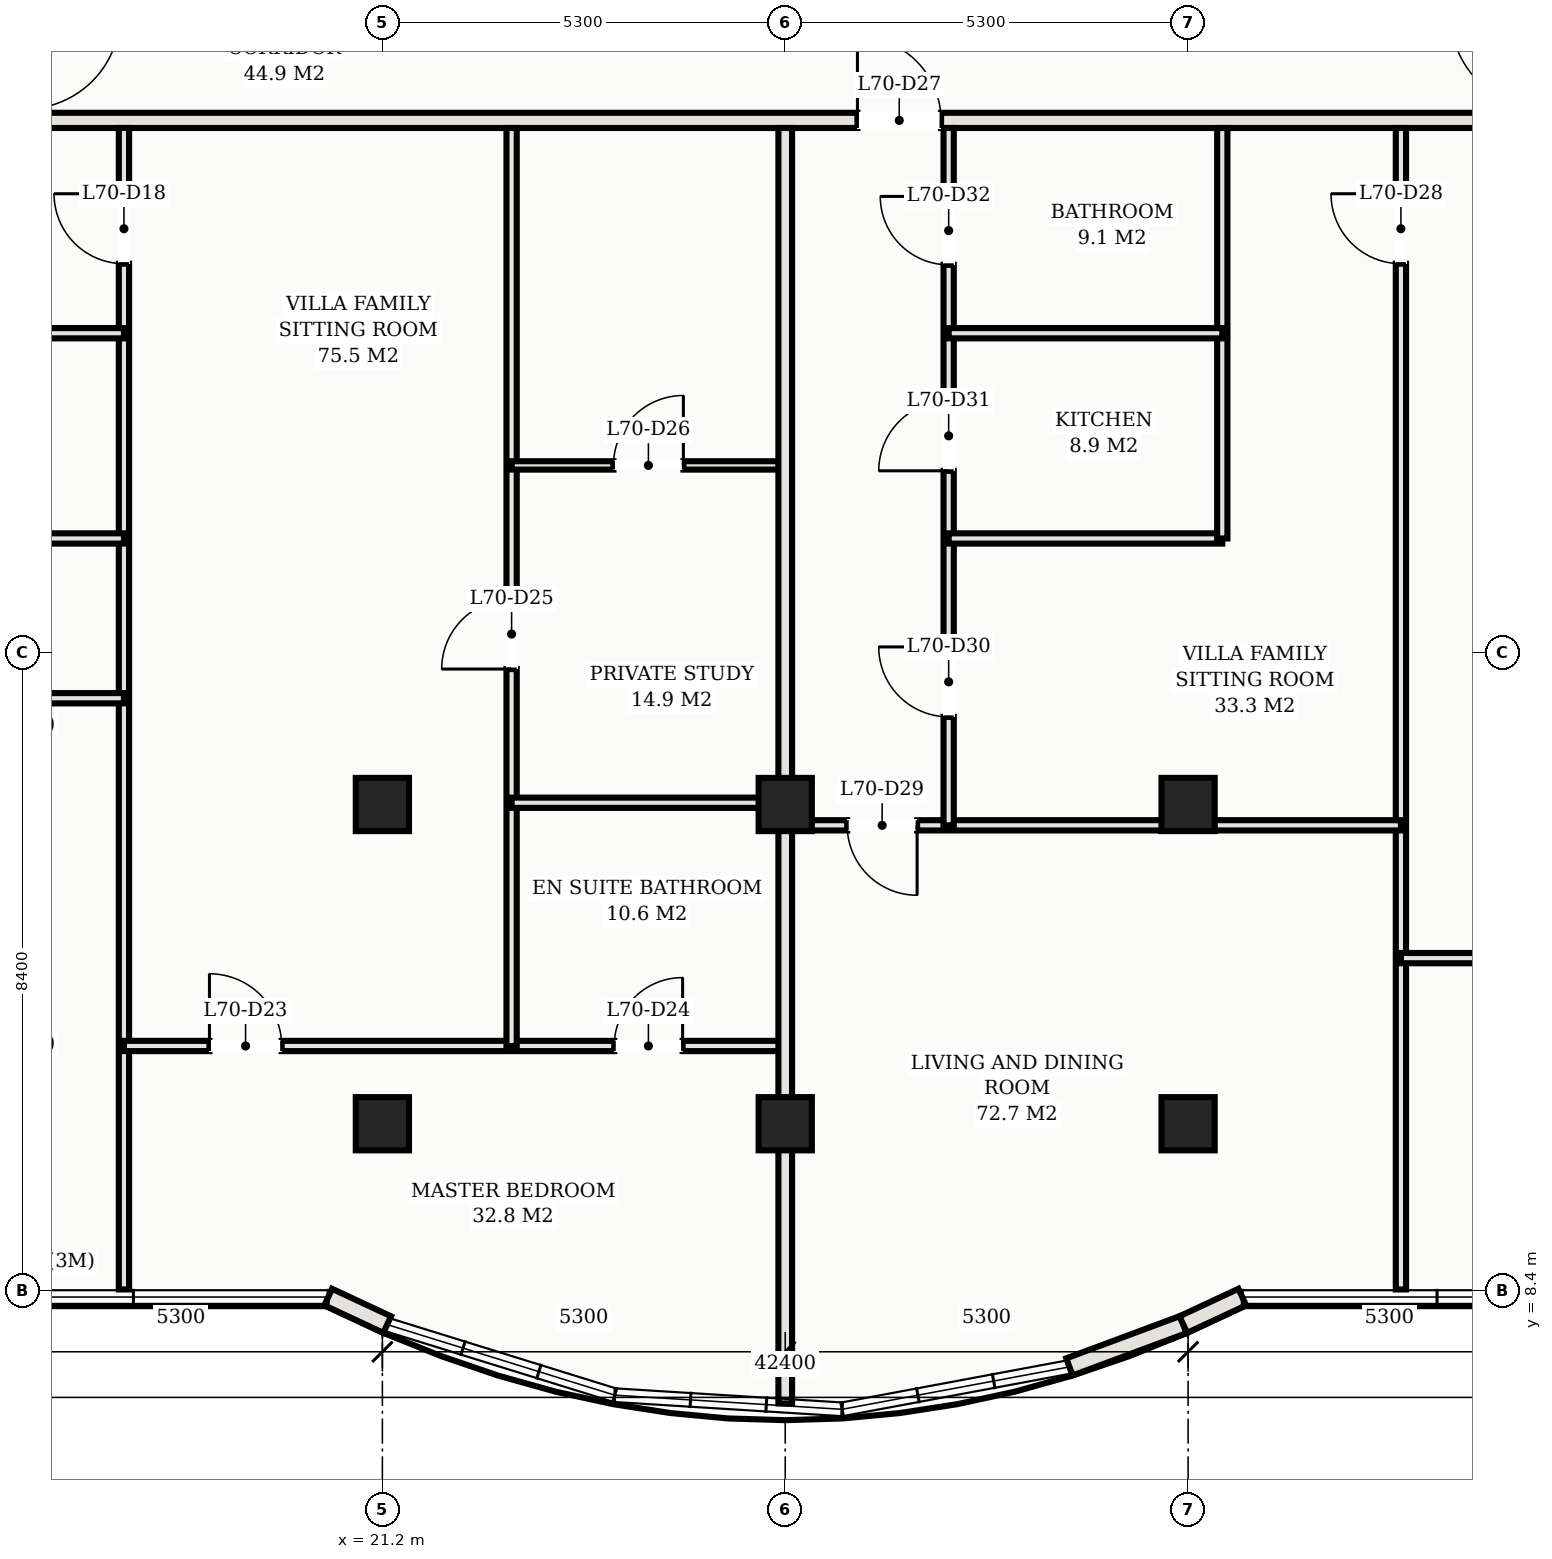
"""IFC4 building model, lengths in metres.
Left out: names, types, materials, properties, quantities, classifications, styles, units other than length and angle.
Written with IfcOpenShell. Run it as: python <this file> out.ifc"""

import sys

from ifc_helpers import new_model, si_unit, direction, frame, frame_2d, origin, origin_2d, place, context, subcontext, project, spatial, rectangle, hollow_rectangle, extrude, element, fill, save


model = new_model("IFC4")
c1 = context("Model", 3, precision=1e-05, world=origin(), true_north=direction((0.0, 1.0)))
c2 = subcontext(c1, "Body", "Model", "MODEL_VIEW")
j1 = project(units=[si_unit("LENGTHUNIT", "METRE"), si_unit("PLANEANGLEUNIT", "RADIAN")], contexts=[c1])
p1 = place(None, origin())
s1 = spatial("IfcSite", under=j1, at=p1, CompositionType="ELEMENT")
p2 = place(p1, origin())
s2 = spatial("IfcBuilding", under=s1, at=p2, CompositionType="ELEMENT")
p3 = place(p2, frame((0.0, 0.0, 252.8)))
s3 = spatial("IfcBuildingStorey", under=s2, at=p3, CompositionType="ELEMENT", Elevation=252.8)
for number, where, z_axis, x_axis in (
    (1, (21.2, 14.8, 0.0), (0.0, 0.0, 1.0), (1.0, 0.0, 0.0)),
    (2, (21.2, 10.6, 0.0), (0.0, 0.0, 1.0), (1.0, 0.0, 0.0)),
    (3, (26.5, 14.8, 0.0), (0.0, 0.0, 1.0), (1.0, 0.0, 0.0)),
    (4, (26.5, 10.6, 0.0), (0.0, 0.0, 1.0), (1.0, 0.0, 0.0)),
    (5, (31.8, 14.8, 0.0), (0.0, 0.0, 1.0), (1.0, 0.0, 0.0)),
    (6, (31.8, 10.6, 0.0), (0.0, 0.0, 1.0), (1.0, 0.0, 0.0)),
):
    element("IfcColumn", number, at=place(p3, frame(where, z_axis=z_axis, x_axis=x_axis)), inside=s3, PredefinedType="COLUMN", context=c2, shape_type="SweptSolid", body=[
        extrude(hollow_rectangle(XDim=0.7, YDim=0.7, WallThickness=0.025, at=origin_2d()), origin(), (0.0, 0.0, 1.0), 3.3),
    ])
p4 = place(p3, frame((20.487, 8.32, 0.0), z_axis=(0.0, 0.0, 1.0), x_axis=(0.906190424584, -0.422869855147, 0.0)))
e7 = element("IfcWall", 7, at=p4, inside=s3, PredefinedType="SOLIDWALL", context=c2, shape_type="SweptSolid", body=[
    extrude(rectangle(XDim=0.856, YDim=0.24, at=frame_2d((0.428, 0.0))), origin(), (0.0, 0.0, 1.0), 3.11),
])
p5 = place(p3, frame((30.239, 7.401, 0.0), z_axis=(0.0, 0.0, 1.0), x_axis=(0.937279890693, 0.34857769077, 0.0)))
e8 = element("IfcWall", 8, at=p5, inside=s3, PredefinedType="SOLIDWALL", context=c2, shape_type="SweptSolid", body=[
    extrude(rectangle(XDim=1.598, YDim=0.24, at=frame_2d((0.799, 0.0))), origin(), (0.0, 0.0, 1.0), 3.11),
])
p6 = place(p3, frame((31.737, 7.958, 0.0), z_axis=(0.0, 0.0, 1.0), x_axis=(0.906190424584, 0.422869855147, 0.0)))
e9 = element("IfcWall", 9, at=p6, inside=s3, PredefinedType="SOLIDWALL", context=c2, shape_type="SweptSolid", body=[
    extrude(rectangle(XDim=0.856, YDim=0.24, at=frame_2d((0.428, 0.0))), origin(), (0.0, 0.0, 1.0), 3.11),
])
p7 = place(p3, frame((8.6, 23.8, 0.0), z_axis=(0.0, 0.0, 1.0), x_axis=(1.0, 0.0, 0.0)))
e10 = element("IfcWall", 10, at=p7, inside=s3, PredefinedType="PARTITIONING", context=c2, shape_type="SweptSolid", body=[
    extrude(rectangle(XDim=35.8, YDim=0.2, at=frame_2d((17.9, 0.0))), origin(), (0.0, 0.0, 1.0), 2.45),
])
p8 = place(p7, frame((2.75, 0.0, 0.0)))
e11 = element("IfcOpeningElement", 11, at=p8, cuts=e10, PredefinedType="OPENING", context=c2, shape_type="SweptSolid", body=[
    extrude(rectangle(XDim=1.1, YDim=2.25, at=frame_2d((0.55, 1.125))), frame((0.0, 0.11, 0.0), z_axis=(0.0, -1.0, 0.0), x_axis=(1.0, 0.0, 0.0)), (0.0, 0.0, 1.0), 0.22),
])
p9 = place(p7, frame((18.85, 0.0, 0.0)))
e12 = element("IfcOpeningElement", 12, at=p9, cuts=e10, PredefinedType="OPENING", context=c2, shape_type="SweptSolid", body=[
    extrude(rectangle(XDim=1.1, YDim=2.25, at=frame_2d((0.55, 1.125))), frame((0.0, 0.11, 0.0), z_axis=(0.0, -1.0, 0.0), x_axis=(1.0, 0.0, 0.0)), (0.0, 0.0, 1.0), 0.22),
])
p10 = place(p7, frame((0.505, 0.0, 0.0)))
e13 = element("IfcOpeningElement", 13, at=p10, cuts=e10, PredefinedType="OPENING", context=c2, shape_type="SweptSolid", body=[
    extrude(rectangle(XDim=0.9, YDim=2.15, at=frame_2d((0.45, 1.075))), frame((0.0, 0.11, 0.0), z_axis=(0.0, -1.0, 0.0), x_axis=(1.0, 0.0, 0.0)), (0.0, 0.0, 1.0), 0.22),
])
p11 = place(p7, frame((34.395, 0.0, 0.0)))
e14 = element("IfcOpeningElement", 14, at=p11, cuts=e10, PredefinedType="OPENING", context=c2, shape_type="SweptSolid", body=[
    extrude(rectangle(XDim=0.9, YDim=2.15, at=frame_2d((0.45, 1.075))), frame((0.0, 0.11, 0.0), z_axis=(0.0, -1.0, 0.0), x_axis=(1.0, 0.0, 0.0)), (0.0, 0.0, 1.0), 0.22),
])
p12 = place(p3, frame((17.8, 8.42, 0.0), z_axis=(0.0, 0.0, 1.0), x_axis=(0.0, 1.0, 0.0)))
e15 = element("IfcWall", 15, at=p12, inside=s3, PredefinedType="PARTITIONING", context=c2, shape_type="SweptSolid", body=[
    extrude(rectangle(XDim=15.28, YDim=0.135, at=frame_2d((7.64, 0.0))), origin(), (0.0, 0.0, 1.0), 2.45),
])
p13 = place(p12, frame((13.495, 0.0, 0.0)))
e16 = element("IfcOpeningElement", 16, at=p13, cuts=e15, PredefinedType="OPENING", context=c2, shape_type="SweptSolid", body=[
    extrude(rectangle(XDim=0.92, YDim=2.15, at=frame_2d((0.46, 1.075))), frame((0.0, 0.078, 0.0), z_axis=(0.0, -1.0, 0.0), x_axis=(1.0, 0.0, 0.0)), (0.0, 0.0, 1.0), 0.155),
])
p14 = place(p3, frame((10.6, 16.198, 0.0), z_axis=(0.0, 0.0, 1.0), x_axis=(1.0, 0.0, 0.0)))
e17 = element("IfcWall", 17, at=p14, inside=s3, PredefinedType="PARTITIONING", context=c2, shape_type="SweptSolid", body=[
    extrude(rectangle(XDim=7.2, YDim=0.135, at=frame_2d((3.6, 0.0))), origin(), (0.0, 0.0, 1.0), 2.45),
])
p15 = place(p14, frame((0.815, 0.0, 0.0)))
e18 = element("IfcOpeningElement", 18, at=p15, cuts=e17, PredefinedType="OPENING", context=c2, shape_type="SweptSolid", body=[
    extrude(rectangle(XDim=0.92, YDim=2.15, at=frame_2d((0.46, 1.075))), frame((0.0, 0.078, 0.0), z_axis=(0.0, -1.0, 0.0), x_axis=(1.0, 0.0, 0.0)), (0.0, 0.0, 1.0), 0.155),
])
for number, where, z_axis, x_axis in (
    (19, (12.75, 18.3, 0.0), (0.0, 0.0, 1.0), (1.0, 0.0, 0.0)),
    (20, (12.75, 21.0, 0.0), (0.0, 0.0, 1.0), (1.0, 0.0, 0.0)),
):
    element("IfcWall", number, at=place(p3, frame(where, z_axis=z_axis, x_axis=x_axis)), inside=s3, PredefinedType="PARTITIONING", context=c2, shape_type="SweptSolid", body=[
        extrude(rectangle(XDim=5.05, YDim=0.135, at=frame_2d((2.525, 0.0))), origin(), (0.0, 0.0, 1.0), 2.45),
    ])
p16 = place(p3, frame((17.8, 11.623, 0.0), z_axis=(0.0, 0.0, 1.0), x_axis=(1.0, 0.0, 0.0)))
e21 = element("IfcWall", 21, at=p16, inside=s3, PredefinedType="PARTITIONING", context=c2, shape_type="SweptSolid", body=[
    extrude(rectangle(XDim=8.7, YDim=0.135, at=frame_2d((4.35, 0.0))), origin(), (0.0, 0.0, 1.0), 2.45),
])
p17 = place(p16, frame((1.125, 0.0, 0.0)))
e22 = element("IfcOpeningElement", 22, at=p17, cuts=e21, PredefinedType="OPENING", context=c2, shape_type="SweptSolid", body=[
    extrude(rectangle(XDim=0.95, YDim=2.15, at=frame_2d((0.475, 1.075))), frame((0.0, 0.078, 0.0), z_axis=(0.0, -1.0, 0.0), x_axis=(1.0, 0.0, 0.0)), (0.0, 0.0, 1.0), 0.155),
])
p18 = place(p16, frame((6.45, 0.0, 0.0)))
e23 = element("IfcOpeningElement", 23, at=p18, cuts=e21, PredefinedType="OPENING", context=c2, shape_type="SweptSolid", body=[
    extrude(rectangle(XDim=0.9, YDim=2.15, at=frame_2d((0.45, 1.075))), frame((0.0, 0.078, 0.0), z_axis=(0.0, -1.0, 0.0), x_axis=(1.0, 0.0, 0.0)), (0.0, 0.0, 1.0), 0.155),
])
p19 = place(p3, frame((22.9, 11.623, 0.0), z_axis=(0.0, 0.0, 1.0), x_axis=(0.0, 1.0, 0.0)))
e24 = element("IfcWall", 24, at=p19, inside=s3, PredefinedType="PARTITIONING", context=c2, shape_type="SweptSolid", body=[
    extrude(rectangle(XDim=12.077, YDim=0.135, at=frame_2d((6.039, 0.0))), origin(), (0.0, 0.0, 1.0), 2.45),
])
p20 = place(p19, frame((4.959, 0.0, 0.0)))
e25 = element("IfcOpeningElement", 25, at=p20, cuts=e24, PredefinedType="OPENING", context=c2, shape_type="SweptSolid", body=[
    extrude(rectangle(XDim=0.92, YDim=2.15, at=frame_2d((0.46, 1.075))), frame((0.0, 0.078, 0.0), z_axis=(0.0, -1.0, 0.0), x_axis=(1.0, 0.0, 0.0)), (0.0, 0.0, 1.0), 0.155),
])
p21 = place(p3, frame((22.9, 14.823, 0.0), z_axis=(0.0, 0.0, 1.0), x_axis=(1.0, 0.0, 0.0)))
e26 = element("IfcWall", 26, at=p21, inside=s3, PredefinedType="PARTITIONING", context=c2, shape_type="SweptSolid", body=[
    extrude(rectangle(XDim=3.6, YDim=0.135, at=frame_2d((1.8, 0.0))), origin(), (0.0, 0.0, 1.0), 2.45),
])
p22 = place(p3, frame((22.9, 19.261, 0.0), z_axis=(0.0, 0.0, 1.0), x_axis=(1.0, 0.0, 0.0)))
e27 = element("IfcWall", 27, at=p22, inside=s3, PredefinedType="MOVABLE", context=c2, shape_type="SweptSolid", body=[
    extrude(rectangle(XDim=3.6, YDim=0.11, at=frame_2d((1.8, 0.0))), origin(), (0.0, 0.0, 1.0), 2.45),
])
p23 = place(p22, frame((1.34, 0.0, 0.0)))
e28 = element("IfcOpeningElement", 28, at=p23, cuts=e27, PredefinedType="OPENING", context=c2, shape_type="SweptSolid", body=[
    extrude(rectangle(XDim=0.92, YDim=2.15, at=frame_2d((0.46, 1.075))), frame((0.0, 0.065, 0.0), z_axis=(0.0, -1.0, 0.0), x_axis=(1.0, 0.0, 0.0)), (0.0, 0.0, 1.0), 0.13),
])
p24 = place(p3, frame((26.5, 6.92, 0.0), z_axis=(0.0, 0.0, 1.0), x_axis=(0.0, 1.0, 0.0)))
e29 = element("IfcWall", 29, at=p24, inside=s3, PredefinedType="PARTITIONING", context=c2, shape_type="SweptSolid", body=[
    extrude(rectangle(XDim=16.78, YDim=0.18, at=frame_2d((8.39, 0.0))), origin(), (0.0, 0.0, 1.0), 2.45),
])
p25 = place(p3, frame((34.6, 8.42, 0.0), z_axis=(0.0, 0.0, 1.0), x_axis=(0.0, 1.0, 0.0)))
e30 = element("IfcWall", 30, at=p25, inside=s3, PredefinedType="PARTITIONING", context=c2, shape_type="SweptSolid", body=[
    extrude(rectangle(XDim=15.28, YDim=0.135, at=frame_2d((7.64, 0.0))), origin(), (0.0, 0.0, 1.0), 2.45),
])
p26 = place(p25, frame((13.495, 0.0, 0.0)))
e31 = element("IfcOpeningElement", 31, at=p26, cuts=e30, PredefinedType="OPENING", context=c2, shape_type="SweptSolid", body=[
    extrude(rectangle(XDim=0.92, YDim=2.15, at=frame_2d((0.46, 1.075))), frame((0.0, 0.078, 0.0), z_axis=(0.0, -1.0, 0.0), x_axis=(1.0, 0.0, 0.0)), (0.0, 0.0, 1.0), 0.155),
])
p27 = place(p3, frame((26.5, 14.526, 0.0), z_axis=(0.0, 0.0, 1.0), x_axis=(1.0, 0.0, 0.0)))
e32 = element("IfcWall", 32, at=p27, inside=s3, PredefinedType="PARTITIONING", context=c2, shape_type="SweptSolid", body=[
    extrude(rectangle(XDim=8.1, YDim=0.135, at=frame_2d((4.05, 0.0))), origin(), (0.0, 0.0, 1.0), 2.45),
])
p28 = place(p27, frame((0.815, 0.0, 0.0)))
e33 = element("IfcOpeningElement", 33, at=p28, cuts=e32, PredefinedType="OPENING", context=c2, shape_type="SweptSolid", body=[
    extrude(rectangle(XDim=0.92, YDim=2.15, at=frame_2d((0.46, 1.075))), frame((0.0, 0.078, 0.0), z_axis=(0.0, -1.0, 0.0), x_axis=(1.0, 0.0, 0.0)), (0.0, 0.0, 1.0), 0.155),
])
p29 = place(p3, frame((28.65, 14.526, 0.0), z_axis=(0.0, 0.0, 1.0), x_axis=(0.0, 1.0, 0.0)))
e34 = element("IfcWall", 34, at=p29, inside=s3, PredefinedType="PARTITIONING", context=c2, shape_type="SweptSolid", body=[
    extrude(rectangle(XDim=9.174, YDim=0.135, at=frame_2d((4.587, 0.0))), origin(), (0.0, 0.0, 1.0), 2.45),
])
p30 = place(p29, frame((1.427, 0.0, 0.0)))
e35 = element("IfcOpeningElement", 35, at=p30, cuts=e34, PredefinedType="OPENING", context=c2, shape_type="SweptSolid", body=[
    extrude(rectangle(XDim=0.92, YDim=2.15, at=frame_2d((0.46, 1.075))), frame((0.0, 0.078, 0.0), z_axis=(0.0, -1.0, 0.0), x_axis=(1.0, 0.0, 0.0)), (0.0, 0.0, 1.0), 0.155),
])
p31 = place(p29, frame((4.664, 0.0, 0.0)))
e36 = element("IfcOpeningElement", 36, at=p31, cuts=e34, PredefinedType="OPENING", context=c2, shape_type="SweptSolid", body=[
    extrude(rectangle(XDim=0.92, YDim=2.15, at=frame_2d((0.46, 1.075))), frame((0.0, 0.078, 0.0), z_axis=(0.0, -1.0, 0.0), x_axis=(1.0, 0.0, 0.0)), (0.0, 0.0, 1.0), 0.155),
])
p32 = place(p29, frame((7.374, 0.0, 0.0)))
e37 = element("IfcOpeningElement", 37, at=p32, cuts=e34, PredefinedType="OPENING", context=c2, shape_type="SweptSolid", body=[
    extrude(rectangle(XDim=0.9, YDim=2.15, at=frame_2d((0.45, 1.075))), frame((0.0, 0.078, 0.0), z_axis=(0.0, -1.0, 0.0), x_axis=(1.0, 0.0, 0.0)), (0.0, 0.0, 1.0), 0.155),
])
p33 = place(p3, frame((28.65, 18.3, 0.0), z_axis=(0.0, 0.0, 1.0), x_axis=(1.0, 0.0, 0.0)))
e38 = element("IfcWall", 38, at=p33, inside=s3, PredefinedType="PARTITIONING", context=c2, shape_type="SweptSolid", body=[
    extrude(rectangle(XDim=3.6, YDim=0.135, at=frame_2d((1.8, 0.0))), origin(), (0.0, 0.0, 1.0), 2.45),
])
p34 = place(p3, frame((32.25, 18.3, 0.0), z_axis=(0.0, 0.0, 1.0), x_axis=(0.0, 1.0, 0.0)))
e39 = element("IfcWall", 39, at=p34, inside=s3, PredefinedType="PARTITIONING", context=c2, shape_type="SweptSolid", body=[
    extrude(rectangle(XDim=5.4, YDim=0.135, at=frame_2d((2.7, 0.0))), origin(), (0.0, 0.0, 1.0), 2.45),
])
p35 = place(p3, frame((28.65, 21.0, 0.0), z_axis=(0.0, 0.0, 1.0), x_axis=(1.0, 0.0, 0.0)))
e40 = element("IfcWall", 40, at=p35, inside=s3, PredefinedType="PARTITIONING", context=c2, shape_type="SweptSolid", body=[
    extrude(rectangle(XDim=3.6, YDim=0.135, at=frame_2d((1.8, 0.0))), origin(), (0.0, 0.0, 1.0), 2.45),
])
p36 = place(p3, frame((34.6, 12.779, 0.0), z_axis=(0.0, 0.0, 1.0), x_axis=(1.0, 0.0, 0.0)))
e41 = element("IfcWall", 41, at=p36, inside=s3, PredefinedType="PARTITIONING", context=c2, shape_type="SweptSolid", body=[
    extrude(rectangle(XDim=7.8, YDim=0.135, at=frame_2d((3.9, 0.0))), origin(), (0.0, 0.0, 1.0), 2.45),
])
p37 = place(p36, frame((1.625, 0.0, 0.0)))
e42 = element("IfcOpeningElement", 42, at=p37, cuts=e41, PredefinedType="OPENING", context=c2, shape_type="SweptSolid", body=[
    extrude(rectangle(XDim=0.95, YDim=2.15, at=frame_2d((0.475, 1.075))), frame((0.0, 0.078, 0.0), z_axis=(0.0, -1.0, 0.0), x_axis=(1.0, 0.0, 0.0)), (0.0, 0.0, 1.0), 0.155),
])
p38 = place(p36, frame((5.55, 0.0, 0.0)))
e43 = element("IfcOpeningElement", 43, at=p38, cuts=e41, PredefinedType="OPENING", context=c2, shape_type="SweptSolid", body=[
    extrude(rectangle(XDim=0.9, YDim=2.15, at=frame_2d((0.45, 1.075))), frame((0.0, 0.078, 0.0), z_axis=(0.0, -1.0, 0.0), x_axis=(1.0, 0.0, 0.0)), (0.0, 0.0, 1.0), 0.155),
])
p39 = place(p13, origin())
e44 = element("IfcDoor", 44, at=p39, inside=s3, OperationType="SINGLE_SWING_RIGHT", PredefinedType="DOOR", context=c2, shape_type="SweptSolid", body=[
    extrude(rectangle(XDim=0.92, YDim=2.15, at=frame_2d((0.46, 1.075))), frame((0.0, 0.025, 0.0), z_axis=(0.0, -1.0, 0.0), x_axis=(1.0, 0.0, 0.0)), (0.0, 0.0, 1.0), 0.05),
])
fill(e16, e44)
p40 = place(p17, origin())
e45 = element("IfcDoor", 45, at=p40, inside=s3, OperationType="SINGLE_SWING_LEFT", PredefinedType="DOOR", context=c2, shape_type="SweptSolid", body=[
    extrude(rectangle(XDim=0.95, YDim=2.15, at=frame_2d((0.475, 1.075))), frame((0.0, 0.025, 0.0), z_axis=(0.0, -1.0, 0.0), x_axis=(1.0, 0.0, 0.0)), (0.0, 0.0, 1.0), 0.05),
])
fill(e22, e45)
p41 = place(p18, origin())
e46 = element("IfcDoor", 46, at=p41, inside=s3, OperationType="SINGLE_SWING_RIGHT", PredefinedType="DOOR", context=c2, shape_type="SweptSolid", body=[
    extrude(rectangle(XDim=0.9, YDim=2.15, at=frame_2d((0.45, 1.075))), frame((0.0, 0.025, 0.0), z_axis=(0.0, -1.0, 0.0), x_axis=(1.0, 0.0, 0.0)), (0.0, 0.0, 1.0), 0.05),
])
fill(e23, e46)
p42 = place(p20, origin())
e47 = element("IfcDoor", 47, at=p42, inside=s3, OperationType="SINGLE_SWING_LEFT", PredefinedType="DOOR", context=c2, shape_type="SweptSolid", body=[
    extrude(rectangle(XDim=0.92, YDim=2.15, at=frame_2d((0.46, 1.075))), frame((0.0, 0.025, 0.0), z_axis=(0.0, -1.0, 0.0), x_axis=(1.0, 0.0, 0.0)), (0.0, 0.0, 1.0), 0.05),
])
fill(e25, e47)
p43 = place(p23, origin())
e48 = element("IfcDoor", 48, at=p43, inside=s3, OperationType="SINGLE_SWING_RIGHT", PredefinedType="DOOR", context=c2, shape_type="SweptSolid", body=[
    extrude(rectangle(XDim=0.92, YDim=2.15, at=frame_2d((0.46, 1.075))), frame((0.0, 0.025, 0.0), z_axis=(0.0, -1.0, 0.0), x_axis=(1.0, 0.0, 0.0)), (0.0, 0.0, 1.0), 0.05),
])
fill(e28, e48)
p44 = place(p9, origin())
e49 = element("IfcDoor", 49, at=p44, inside=s3, OperationType="SINGLE_SWING_LEFT", PredefinedType="DOOR", context=c2, shape_type="SweptSolid", body=[
    extrude(rectangle(XDim=1.1, YDim=2.25, at=frame_2d((0.55, 1.125))), frame((0.0, 0.025, 0.0), z_axis=(0.0, -1.0, 0.0), x_axis=(1.0, 0.0, 0.0)), (0.0, 0.0, 1.0), 0.05),
])
fill(e12, e49)
p45 = place(p26, origin())
e50 = element("IfcDoor", 50, at=p45, inside=s3, OperationType="SINGLE_SWING_RIGHT", PredefinedType="DOOR", context=c2, shape_type="SweptSolid", body=[
    extrude(rectangle(XDim=0.92, YDim=2.15, at=frame_2d((0.46, 1.075))), frame((0.0, 0.025, 0.0), z_axis=(0.0, -1.0, 0.0), x_axis=(1.0, 0.0, 0.0)), (0.0, 0.0, 1.0), 0.05),
])
fill(e31, e50)
p46 = place(p28, frame((0.92, 0.0, 0.0), z_axis=(0.0, 0.0, 1.0), x_axis=(-1.0, 0.0, 0.0)))
e51 = element("IfcDoor", 51, at=p46, inside=s3, OperationType="SINGLE_SWING_LEFT", PredefinedType="DOOR", context=c2, shape_type="SweptSolid", body=[
    extrude(rectangle(XDim=0.92, YDim=2.15, at=frame_2d((0.46, 1.075))), frame((0.0, 0.025, 0.0), z_axis=(0.0, -1.0, 0.0), x_axis=(1.0, 0.0, 0.0)), (0.0, 0.0, 1.0), 0.05),
])
fill(e33, e51)
p47 = place(p30, origin())
e52 = element("IfcDoor", 52, at=p47, inside=s3, OperationType="SINGLE_SWING_RIGHT", PredefinedType="DOOR", context=c2, shape_type="SweptSolid", body=[
    extrude(rectangle(XDim=0.92, YDim=2.15, at=frame_2d((0.46, 1.075))), frame((0.0, 0.025, 0.0), z_axis=(0.0, -1.0, 0.0), x_axis=(1.0, 0.0, 0.0)), (0.0, 0.0, 1.0), 0.05),
])
fill(e35, e52)
p48 = place(p31, origin())
e53 = element("IfcDoor", 53, at=p48, inside=s3, OperationType="SINGLE_SWING_LEFT", PredefinedType="DOOR", context=c2, shape_type="SweptSolid", body=[
    extrude(rectangle(XDim=0.92, YDim=2.15, at=frame_2d((0.46, 1.075))), frame((0.0, 0.025, 0.0), z_axis=(0.0, -1.0, 0.0), x_axis=(1.0, 0.0, 0.0)), (0.0, 0.0, 1.0), 0.05),
])
fill(e36, e53)
p49 = place(p32, origin())
e54 = element("IfcDoor", 54, at=p49, inside=s3, OperationType="SINGLE_SWING_RIGHT", PredefinedType="DOOR", context=c2, shape_type="SweptSolid", body=[
    extrude(rectangle(XDim=0.9, YDim=2.15, at=frame_2d((0.45, 1.075))), frame((0.0, 0.025, 0.0), z_axis=(0.0, -1.0, 0.0), x_axis=(1.0, 0.0, 0.0)), (0.0, 0.0, 1.0), 0.05),
])
fill(e37, e54)
save(model, sys.argv[1])
